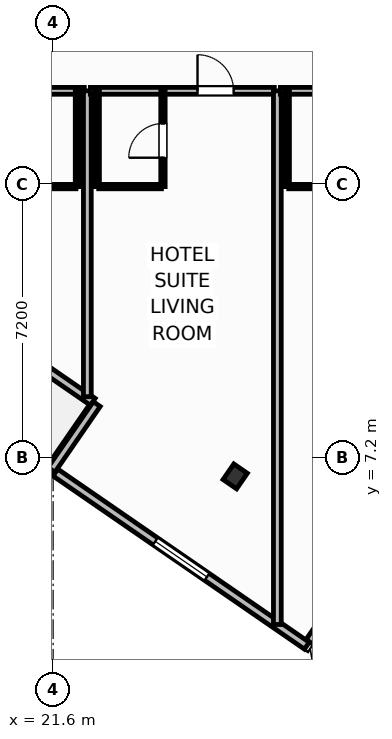
"""IFC4 building model, lengths in metres.
Left out: names, types, materials, properties, quantities, classifications, styles, units other than length and angle.
Written with IfcOpenShell. Run it as: python <this file> out.ifc"""

import sys

from ifc_helpers import new_model, si_unit, direction, frame, frame_2d, origin, origin_2d, place, context, subcontext, project, spatial, rectangle, i_section, extrude, element, fill, save


model = new_model("IFC4")
c1 = context("Model", 3, precision=1e-05, world=origin(), true_north=direction((0.0, 1.0)))
c2 = subcontext(c1, "Body", "Model", "MODEL_VIEW")
j1 = project(units=[si_unit("LENGTHUNIT", "METRE"), si_unit("PLANEANGLEUNIT", "RADIAN")], contexts=[c1])
p1 = place(None, origin())
s1 = spatial("IfcSite", under=j1, at=p1, CompositionType="ELEMENT")
p2 = place(p1, origin())
s2 = spatial("IfcBuilding", under=s1, at=p2, CompositionType="ELEMENT")
p3 = place(p2, frame((0.0, 0.0, 27.0)))
s3 = spatial("IfcBuildingStorey", under=s2, at=p3, CompositionType="ELEMENT", Elevation=27.0)
p4 = place(p3, frame((26.391, 6.705, -0.25), z_axis=(0.0, 0.0, 1.0), x_axis=(0.823532597628, -0.567268949127, 0.0)))
e1 = element("IfcColumn", 1, at=p4, inside=s3, PredefinedType="COLUMN", context=c2, shape_type="SweptSolid", body=[
    extrude(i_section(OverallWidth=0.432, OverallDepth=0.498, WebThickness=0.056, FlangeThickness=0.089, FilletRadius=0.025, at=origin_2d()), origin(), (0.0, 0.0, 1.0), 3.95),
])
p5 = place(p3, frame((22.643, 8.667, 0.0), z_axis=(0.0, 0.0, 1.0), x_axis=(-0.823534636215, 0.567265989598, 0.0)))
e2 = element("IfcWall", 2, at=p5, inside=s3, PredefinedType="SOLIDWALL", context=c2, shape_type="SweptSolid", body=[
    extrude(rectangle(XDim=6.0, YDim=0.22, at=frame_2d((3.0, 0.0))), origin(), (0.0, 0.0, 1.0), 2.73),
])
p6 = place(p5, frame((2.176, 0.0, 0.0)))
e3 = element("IfcOpeningElement", 3, at=p6, cuts=e2, PredefinedType="OPENING", context=c2, shape_type="SweptSolid", body=[
    extrude(rectangle(XDim=1.5, YDim=2.25, at=frame_2d((0.75, 1.125))), frame((0.0, 0.12, 0.0), z_axis=(0.0, -1.0, 0.0), x_axis=(1.0, 0.0, 0.0)), (0.0, 0.0, 1.0), 0.24),
])
p7 = place(p3, frame((22.747, 8.607, 0.0), z_axis=(0.0, 0.0, 1.0), x_axis=(-0.567219383419, -0.823566737474, 0.0)))
e4 = element("IfcWall", 4, at=p7, inside=s3, PredefinedType="SOLIDWALL", context=c2, shape_type="SweptSolid", body=[
    extrude(rectangle(XDim=2.1, YDim=0.22, at=frame_2d((1.05, 0.0))), origin(), (0.0, 0.0, 1.0), 2.73),
])
p8 = place(p3, frame((21.659, 6.807, 0.0), z_axis=(0.0, 0.0, 1.0), x_axis=(0.823535360023, -0.567264938799, 0.0)))
e5 = element("IfcWall", 5, at=p8, inside=s3, PredefinedType="SOLIDWALL", context=c2, shape_type="SweptSolid", body=[
    extrude(rectangle(XDim=8.035, YDim=0.22, at=frame_2d((4.018, 0.0))), origin(), (0.0, 0.0, 1.0), 2.73),
])
p9 = place(p8, frame((3.192, 0.0, 0.8)))
e6 = element("IfcOpeningElement", 6, at=p9, cuts=e5, PredefinedType="OPENING", context=c2, shape_type="SweptSolid", body=[
    extrude(rectangle(XDim=1.65, YDim=1.65, at=frame_2d((0.825, 0.825))), frame((0.0, 0.12, 0.0), z_axis=(0.0, -1.0, 0.0), x_axis=(1.0, 0.0, 0.0)), (0.0, 0.0, 1.0), 0.24),
])
p10 = place(p3, frame((28.347, 2.352, 0.0), z_axis=(0.0, 0.0, 1.0), x_axis=(0.567215821234, 0.823569190865, 0.0)))
e7 = element("IfcWall", 7, at=p10, inside=s3, PredefinedType="SOLIDWALL", context=c2, shape_type="SweptSolid", body=[
    extrude(rectangle(XDim=1.975, YDim=0.22, at=frame_2d((0.988, 0.0))), origin(), (0.0, 0.0, 1.0), 2.73),
])
p11 = place(p3, frame((17.58, 16.85, 0.0), z_axis=(0.0, 0.0, 1.0), x_axis=(1.0, 0.0, 0.0)))
e8 = element("IfcWall", 8, at=p11, inside=s3, PredefinedType="PARTITIONING", context=c2, shape_type="SweptSolid", body=[
    extrude(rectangle(XDim=4.84, YDim=0.18, at=frame_2d((2.42, 0.0))), origin(), (0.0, 0.0, 1.0), 3.45),
])
p12 = place(p11, frame((0.929, 0.0, 0.0)))
e9 = element("IfcOpeningElement", 9, at=p12, cuts=e8, PredefinedType="OPENING", context=c2, shape_type="SweptSolid", body=[
    extrude(rectangle(XDim=0.95, YDim=2.15, at=frame_2d((0.475, 1.075))), frame((0.0, 0.1, 0.0), z_axis=(0.0, -1.0, 0.0), x_axis=(1.0, 0.0, 0.0)), (0.0, 0.0, 1.0), 0.2),
])
p13 = place(p3, frame((20.55, 14.33, 0.0), z_axis=(0.0, 0.0, 1.0), x_axis=(1.0, 0.0, 0.0)))
e10 = element("IfcWall", 10, at=p13, inside=s3, PredefinedType="PARTITIONING", context=c2, shape_type="SweptSolid", body=[
    extrude(rectangle(XDim=1.65, YDim=0.115, at=frame_2d((0.825, 0.0))), origin(), (0.0, 0.0, 1.0), 3.45),
])
p14 = place(p3, frame((22.24, 14.33, 0.0), z_axis=(0.0, 0.0, 1.0), x_axis=(0.0, 1.0, 0.0)))
e11 = element("IfcWall", 11, at=p14, inside=s3, PredefinedType="PARTITIONING", context=c2, shape_type="SweptSolid", body=[
    extrude(rectangle(XDim=2.52, YDim=0.115, at=frame_2d((1.26, 0.0))), origin(), (0.0, 0.0, 1.0), 3.45),
])
p15 = place(p3, frame((22.5, 8.802, 0.0), z_axis=(0.0, 0.0, 1.0), x_axis=(0.0, 1.0, 0.0)))
e12 = element("IfcWall", 12, at=p15, inside=s3, PredefinedType="PARTITIONING", context=c2, shape_type="SweptSolid", body=[
    extrude(rectangle(XDim=8.048, YDim=0.205, at=frame_2d((4.024, 0.0))), origin(), (0.0, 0.0, 1.0), 3.45),
])
p16 = place(p3, frame((22.58, 16.85, 0.0), z_axis=(0.0, 0.0, 1.0), x_axis=(1.0, 0.0, 0.0)))
e13 = element("IfcWall", 13, at=p16, inside=s3, PredefinedType="PARTITIONING", context=c2, shape_type="SweptSolid", body=[
    extrude(rectangle(XDim=4.84, YDim=0.18, at=frame_2d((2.42, 0.0))), origin(), (0.0, 0.0, 1.0), 3.45),
])
p17 = place(p16, frame((2.819, 0.0, 0.0)))
e14 = element("IfcOpeningElement", 14, at=p17, cuts=e13, PredefinedType="OPENING", context=c2, shape_type="SweptSolid", body=[
    extrude(rectangle(XDim=0.95, YDim=2.15, at=frame_2d((0.475, 1.075))), frame((0.0, 0.1, 0.0), z_axis=(0.0, -1.0, 0.0), x_axis=(1.0, 0.0, 0.0)), (0.0, 0.0, 1.0), 0.2),
])
p18 = place(p3, frame((22.8, 14.33, 0.0), z_axis=(0.0, 0.0, 1.0), x_axis=(1.0, 0.0, 0.0)))
e15 = element("IfcWall", 15, at=p18, inside=s3, PredefinedType="PARTITIONING", context=c2, shape_type="SweptSolid", body=[
    extrude(rectangle(XDim=1.65, YDim=0.115, at=frame_2d((0.825, 0.0))), origin(), (0.0, 0.0, 1.0), 3.45),
])
p19 = place(p3, frame((24.49, 14.33, 0.0), z_axis=(0.0, 0.0, 1.0), x_axis=(0.0, 1.0, 0.0)))
e16 = element("IfcWall", 16, at=p19, inside=s3, PredefinedType="PARTITIONING", context=c2, shape_type="SweptSolid", body=[
    extrude(rectangle(XDim=2.52, YDim=0.115, at=frame_2d((1.26, 0.0))), origin(), (0.0, 0.0, 1.0), 3.45),
])
p20 = place(p19, frame((0.76, 0.0, 0.0)))
e17 = element("IfcOpeningElement", 17, at=p20, cuts=e16, PredefinedType="OPENING", context=c2, shape_type="SweptSolid", body=[
    extrude(rectangle(XDim=0.9, YDim=2.05, at=frame_2d((0.45, 1.025))), frame((0.0, 0.067, 0.0), z_axis=(0.0, -1.0, 0.0), x_axis=(1.0, 0.0, 0.0)), (0.0, 0.0, 1.0), 0.135),
])
p21 = place(p3, frame((22.76, 14.33, 0.0), z_axis=(0.0, 0.0, 1.0), x_axis=(0.0, 1.0, 0.0)))
e18 = element("IfcWall", 18, at=p21, inside=s3, PredefinedType="PARTITIONING", context=c2, shape_type="SweptSolid", body=[
    extrude(rectangle(XDim=2.52, YDim=0.115, at=frame_2d((1.26, 0.0))), origin(), (0.0, 0.0, 1.0), 3.45),
])
p22 = place(p3, frame((27.5, 2.808, 0.0), z_axis=(0.0, 0.0, 1.0), x_axis=(0.0, 1.0, 0.0)))
e19 = element("IfcWall", 19, at=p22, inside=s3, PredefinedType="PARTITIONING", context=c2, shape_type="SweptSolid", body=[
    extrude(rectangle(XDim=14.042, YDim=0.205, at=frame_2d((7.021, 0.0))), origin(), (0.0, 0.0, 1.0), 3.45),
])
p23 = place(p3, frame((27.58, 16.85, 0.0), z_axis=(0.0, 0.0, 1.0), x_axis=(1.0, 0.0, 0.0)))
e20 = element("IfcWall", 20, at=p23, inside=s3, PredefinedType="PARTITIONING", context=c2, shape_type="SweptSolid", body=[
    extrude(rectangle(XDim=4.84, YDim=0.18, at=frame_2d((2.42, 0.0))), origin(), (0.0, 0.0, 1.0), 3.45),
])
p24 = place(p23, frame((2.819, 0.0, 0.0)))
e21 = element("IfcOpeningElement", 21, at=p24, cuts=e20, PredefinedType="OPENING", context=c2, shape_type="SweptSolid", body=[
    extrude(rectangle(XDim=0.95, YDim=2.15, at=frame_2d((0.475, 1.075))), frame((0.0, 0.1, 0.0), z_axis=(0.0, -1.0, 0.0), x_axis=(1.0, 0.0, 0.0)), (0.0, 0.0, 1.0), 0.2),
])
p25 = place(p3, frame((27.8, 14.33, 0.0), z_axis=(0.0, 0.0, 1.0), x_axis=(1.0, 0.0, 0.0)))
e22 = element("IfcWall", 22, at=p25, inside=s3, PredefinedType="PARTITIONING", context=c2, shape_type="SweptSolid", body=[
    extrude(rectangle(XDim=1.65, YDim=0.115, at=frame_2d((0.825, 0.0))), origin(), (0.0, 0.0, 1.0), 3.45),
])
p26 = place(p3, frame((27.76, 14.33, 0.0), z_axis=(0.0, 0.0, 1.0), x_axis=(0.0, 1.0, 0.0)))
e23 = element("IfcWall", 23, at=p26, inside=s3, PredefinedType="PARTITIONING", context=c2, shape_type="SweptSolid", body=[
    extrude(rectangle(XDim=2.52, YDim=0.115, at=frame_2d((1.26, 0.0))), origin(), (0.0, 0.0, 1.0), 3.45),
])
p27 = place(p9, origin())
e24 = element("IfcWindow", 24, at=p27, inside=s3, PartitioningType="SINGLE_PANEL", PredefinedType="WINDOW", context=c2, shape_type="SweptSolid", body=[
    extrude(rectangle(XDim=1.65, YDim=1.65, at=frame_2d((0.825, 0.825))), frame((0.0, 0.03, 0.0), z_axis=(0.0, -1.0, 0.0), x_axis=(1.0, 0.0, 0.0)), (0.0, 0.0, 1.0), 0.06),
])
fill(e6, e24)
p28 = place(p17, origin())
e25 = element("IfcDoor", 25, at=p28, inside=s3, OperationType="SINGLE_SWING_LEFT", PredefinedType="DOOR", context=c2, shape_type="SweptSolid", body=[
    extrude(rectangle(XDim=0.95, YDim=2.15, at=frame_2d((0.475, 1.075))), frame((0.0, 0.025, 0.0), z_axis=(0.0, -1.0, 0.0), x_axis=(1.0, 0.0, 0.0)), (0.0, 0.0, 1.0), 0.05),
])
fill(e14, e25)
p29 = place(p20, origin())
e26 = element("IfcDoor", 26, at=p29, inside=s3, OperationType="SINGLE_SWING_LEFT", PredefinedType="DOOR", context=c2, shape_type="SweptSolid", body=[
    extrude(rectangle(XDim=0.9, YDim=2.05, at=frame_2d((0.45, 1.025))), frame((0.0, 0.025, 0.0), z_axis=(0.0, -1.0, 0.0), x_axis=(1.0, 0.0, 0.0)), (0.0, 0.0, 1.0), 0.05),
])
fill(e17, e26)
save(model, sys.argv[1])
